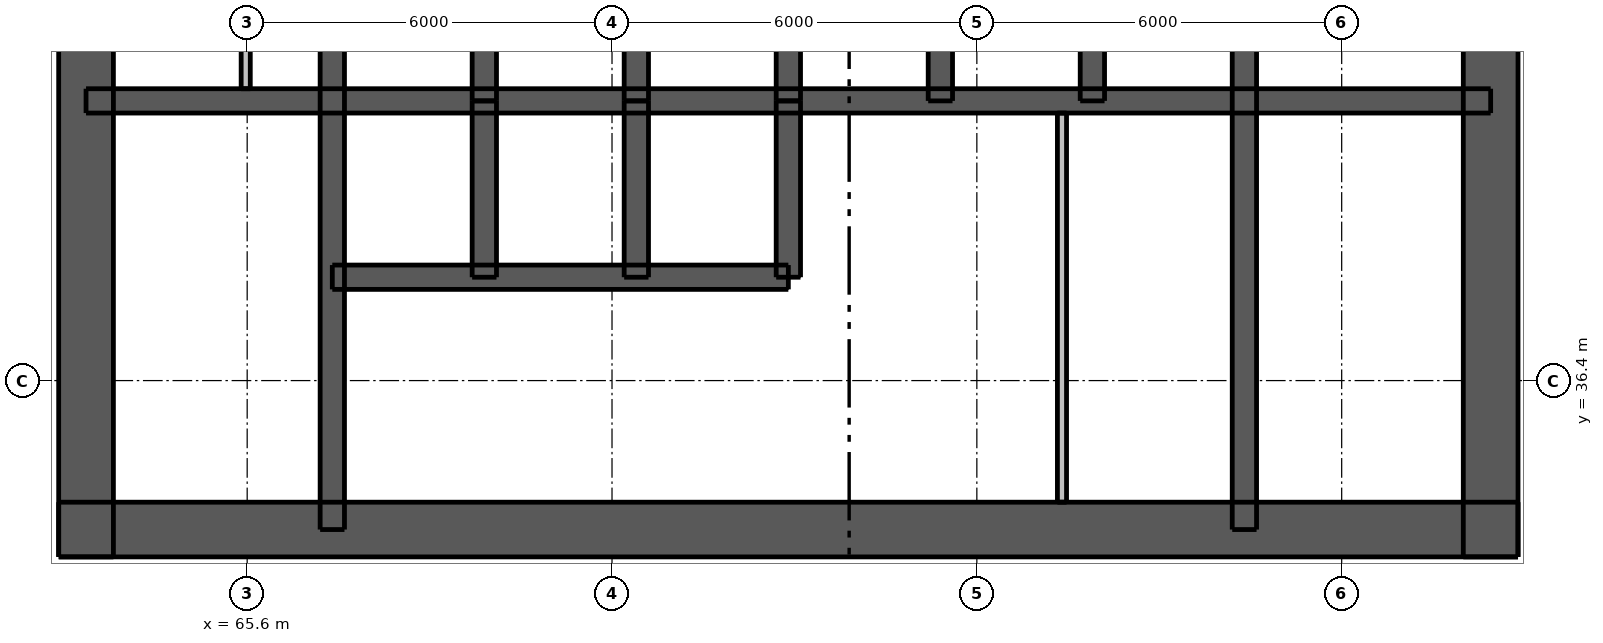
"""IFC4 building model, lengths in metres.
Left out: names, types, materials, properties, quantities, classifications, styles, units other than length and angle.
Written with IfcOpenShell. Run it as: python <this file> out.ifc"""

import sys

from ifc_helpers import new_model, si_unit, direction, frame, frame_2d, origin, place, context, subcontext, project, spatial, rectangle, extrude, element, fill, save


model = new_model("IFC4")
c1 = context("Model", 3, precision=1e-05, world=origin(), true_north=direction((0.0, 1.0)))
c2 = subcontext(c1, "Body", "Model", "MODEL_VIEW")
j1 = project(units=[si_unit("LENGTHUNIT", "METRE"), si_unit("PLANEANGLEUNIT", "RADIAN")], contexts=[c1])
p1 = place(None, origin())
s1 = spatial("IfcSite", under=j1, at=p1, CompositionType="ELEMENT")
p2 = place(p1, origin())
s2 = spatial("IfcBuilding", under=s1, at=p2, CompositionType="ELEMENT")
p3 = place(p2, frame((0.0, 0.0, 49.9)))
s3 = spatial("IfcBuildingStorey", under=s2, at=p3, CompositionType="ELEMENT", Elevation=49.9)
p4 = place(p3, frame((62.5, 33.95, 0.0), z_axis=(0.0, 0.0, 1.0), x_axis=(1.0, 0.0, 0.0)))
e1 = element("IfcWall", 1, at=p4, inside=s3, PredefinedType="SHEAR", context=c2, shape_type="SweptSolid", body=[
    extrude(rectangle(XDim=24.0, YDim=0.9, at=frame_2d((12.0, 0.0))), origin(), (0.0, 0.0, 1.0), 3.05),
])
p5 = place(p4, frame((2.05, 0.0, 0.0)))
e2 = element("IfcOpeningElement", 2, at=p5, cuts=e1, PredefinedType="OPENING", context=c2, shape_type="SweptSolid", body=[
    extrude(rectangle(XDim=1.1, YDim=2.1, at=frame_2d((0.55, 1.05))), frame((0.0, 0.46, 0.0), z_axis=(0.0, -1.0, 0.0), x_axis=(1.0, 0.0, 0.0)), (0.0, 0.0, 1.0), 0.92),
])
p6 = place(p4, frame((20.85, 0.0, 0.0)))
e3 = element("IfcOpeningElement", 3, at=p6, cuts=e1, PredefinedType="OPENING", context=c2, shape_type="SweptSolid", body=[
    extrude(rectangle(XDim=1.1, YDim=2.1, at=frame_2d((0.55, 1.05))), frame((0.0, 0.46, 0.0), z_axis=(0.0, -1.0, 0.0), x_axis=(1.0, 0.0, 0.0)), (0.0, 0.0, 1.0), 0.92),
])
p7 = place(p4, frame((8.0, 0.0, 0.0)))
e4 = element("IfcOpeningElement", 4, at=p7, cuts=e1, PredefinedType="OPENING", context=c2, shape_type="SweptSolid", body=[
    extrude(rectangle(XDim=1.1, YDim=2.1, at=frame_2d((0.55, 1.05))), frame((0.0, 0.46, 0.0), z_axis=(0.0, -1.0, 0.0), x_axis=(1.0, 0.0, 0.0)), (0.0, 0.0, 1.0), 0.92),
])
p8 = place(p4, frame((17.488, 0.0, 0.0)))
e5 = element("IfcOpeningElement", 5, at=p8, cuts=e1, PredefinedType="OPENING", context=c2, shape_type="SweptSolid", body=[
    extrude(rectangle(XDim=0.9, YDim=2.1, at=frame_2d((0.45, 1.05))), frame((0.0, 0.46, 0.0), z_axis=(0.0, -1.0, 0.0), x_axis=(1.0, 0.0, 0.0)), (0.0, 0.0, 1.0), 0.92),
])
p9 = place(p3, frame((62.95, 33.5, 0.0), z_axis=(0.0, 0.0, 1.0), x_axis=(0.0, 1.0, 0.0)))
e6 = element("IfcWall", 6, at=p9, inside=s3, PredefinedType="SHEAR", context=c2, shape_type="SweptSolid", body=[
    extrude(rectangle(XDim=24.0, YDim=0.9, at=frame_2d((12.0, 0.0))), origin(), (0.0, 0.0, 1.0), 3.05),
])
p10 = place(p9, frame((11.2, 0.0, 0.0)))
e7 = element("IfcOpeningElement", 7, at=p10, cuts=e6, PredefinedType="OPENING", context=c2, shape_type="SweptSolid", body=[
    extrude(rectangle(XDim=1.6, YDim=2.1, at=frame_2d((0.8, 1.05))), frame((0.0, 0.46, 0.0), z_axis=(0.0, -1.0, 0.0), x_axis=(1.0, 0.0, 0.0)), (0.0, 0.0, 1.0), 0.92),
])
p11 = place(p3, frame((86.05, 33.5, 0.0), z_axis=(0.0, 0.0, 1.0), x_axis=(0.0, 1.0, 0.0)))
e8 = element("IfcWall", 8, at=p11, inside=s3, PredefinedType="SHEAR", context=c2, shape_type="SweptSolid", body=[
    extrude(rectangle(XDim=24.0, YDim=0.9, at=frame_2d((12.0, 0.0))), origin(), (0.0, 0.0, 1.0), 3.05),
])
p12 = place(p11, frame((11.2, 0.0, 0.0)))
e9 = element("IfcOpeningElement", 9, at=p12, cuts=e8, PredefinedType="OPENING", context=c2, shape_type="SweptSolid", body=[
    extrude(rectangle(XDim=1.6, YDim=2.1, at=frame_2d((0.8, 1.05))), frame((0.0, 0.46, 0.0), z_axis=(0.0, -1.0, 0.0), x_axis=(1.0, 0.0, 0.0)), (0.0, 0.0, 1.0), 0.92),
])
p13 = place(p3, frame((62.95, 41.0, 0.0), z_axis=(0.0, 0.0, 1.0), x_axis=(1.0, 0.0, 0.0)))
e10 = element("IfcWall", 10, at=p13, inside=s3, PredefinedType="SHEAR", context=c2, shape_type="SweptSolid", body=[
    extrude(rectangle(XDim=23.1, YDim=0.4, at=frame_2d((11.55, 0.0))), origin(), (0.0, 0.0, 1.0), 3.05),
])
p14 = place(p3, frame((67.0, 33.95, 0.0), z_axis=(0.0, 0.0, 1.0), x_axis=(0.0, 1.0, 0.0)))
e11 = element("IfcWall", 11, at=p14, inside=s3, PredefinedType="SHEAR", context=c2, shape_type="SweptSolid", body=[
    extrude(rectangle(XDim=9.95, YDim=0.4, at=frame_2d((4.975, 0.0))), origin(), (0.0, 0.0, 1.0), 3.05),
])
p15 = place(p14, frame((0.65, 0.0, 0.0)))
e12 = element("IfcOpeningElement", 12, at=p15, cuts=e11, PredefinedType="OPENING", context=c2, shape_type="SweptSolid", body=[
    extrude(rectangle(XDim=1.1, YDim=2.1, at=frame_2d((0.55, 1.05))), frame((0.0, 0.21, 0.0), z_axis=(0.0, -1.0, 0.0), x_axis=(1.0, 0.0, 0.0)), (0.0, 0.0, 1.0), 0.42),
])
p16 = place(p3, frame((82.0, 33.95, 0.0), z_axis=(0.0, 0.0, 1.0), x_axis=(0.0, 1.0, 0.0)))
e13 = element("IfcWall", 13, at=p16, inside=s3, PredefinedType="SHEAR", context=c2, shape_type="SweptSolid", body=[
    extrude(rectangle(XDim=9.95, YDim=0.4, at=frame_2d((4.975, 0.0))), origin(), (0.0, 0.0, 1.0), 3.05),
])
for number, where, z_axis, x_axis in (
    (14, (69.5, 41.0, 0.0), (0.0, 0.0, 1.0), (0.0, 1.0, 0.0)),
    (15, (72.0, 41.0, 0.0), (0.0, 0.0, 1.0), (0.0, 1.0, 0.0)),
    (16, (74.5, 41.0, 0.0), (0.0, 0.0, 1.0), (0.0, 1.0, 0.0)),
    (17, (77.0, 41.0, 0.0), (0.0, 0.0, 1.0), (0.0, 1.0, 0.0)),
    (18, (79.5, 41.0, 0.0), (0.0, 0.0, 1.0), (0.0, 1.0, 0.0)),
):
    element("IfcWall", number, at=place(p3, frame(where, z_axis=z_axis, x_axis=x_axis)), inside=s3, PredefinedType="SHEAR", context=c2, shape_type="SweptSolid", body=[
        extrude(rectangle(XDim=2.9, YDim=0.4, at=frame_2d((1.45, 0.0))), origin(), (0.0, 0.0, 1.0), 3.05),
    ])
p17 = place(p3, frame((67.0, 38.1, 0.0), z_axis=(0.0, 0.0, 1.0), x_axis=(1.0, 0.0, 0.0)))
e19 = element("IfcWall", 19, at=p17, inside=s3, PredefinedType="SHEAR", context=c2, shape_type="SweptSolid", body=[
    extrude(rectangle(XDim=7.5, YDim=0.4, at=frame_2d((3.75, 0.0))), origin(), (0.0, 0.0, 1.0), 3.05),
])
p18 = place(p17, frame((0.7, 0.0, 0.0)))
e20 = element("IfcOpeningElement", 20, at=p18, cuts=e19, PredefinedType="OPENING", context=c2, shape_type="SweptSolid", body=[
    extrude(rectangle(XDim=1.1, YDim=2.1, at=frame_2d((0.55, 1.05))), frame((0.0, 0.21, 0.0), z_axis=(0.0, -1.0, 0.0), x_axis=(1.0, 0.0, 0.0)), (0.0, 0.0, 1.0), 0.42),
])
p19 = place(p17, frame((3.2, 0.0, 0.0)))
e21 = element("IfcOpeningElement", 21, at=p19, cuts=e19, PredefinedType="OPENING", context=c2, shape_type="SweptSolid", body=[
    extrude(rectangle(XDim=1.1, YDim=2.1, at=frame_2d((0.55, 1.05))), frame((0.0, 0.21, 0.0), z_axis=(0.0, -1.0, 0.0), x_axis=(1.0, 0.0, 0.0)), (0.0, 0.0, 1.0), 0.42),
])
p20 = place(p17, frame((5.65, 0.0, 0.0)))
e22 = element("IfcOpeningElement", 22, at=p20, cuts=e19, PredefinedType="OPENING", context=c2, shape_type="SweptSolid", body=[
    extrude(rectangle(XDim=1.2, YDim=2.1, at=frame_2d((0.6, 1.05))), frame((0.0, 0.21, 0.0), z_axis=(0.0, -1.0, 0.0), x_axis=(1.0, 0.0, 0.0)), (0.0, 0.0, 1.0), 0.42),
])
for number, where, z_axis, x_axis in (
    (23, (69.5, 38.1, 0.0), (0.0, 0.0, 1.0), (0.0, 1.0, 0.0)),
    (24, (72.0, 38.1, 0.0), (0.0, 0.0, 1.0), (0.0, 1.0, 0.0)),
    (25, (74.5, 38.1, 0.0), (0.0, 0.0, 1.0), (0.0, 1.0, 0.0)),
):
    element("IfcWall", number, at=place(p3, frame(where, z_axis=z_axis, x_axis=x_axis)), inside=s3, PredefinedType="SHEAR", context=c2, shape_type="SweptSolid", body=[
        extrude(rectangle(XDim=2.9, YDim=0.4, at=frame_2d((1.45, 0.0))), origin(), (0.0, 0.0, 1.0), 3.05),
    ])
p21 = place(p3, frame((79.0, 34.4, 0.0), z_axis=(0.0, 0.0, 1.0), x_axis=(0.0, 1.0, 0.0)))
e26 = element("IfcWall", 26, at=p21, inside=s3, PredefinedType="PLUMBINGWALL", context=c2, shape_type="SweptSolid", body=[
    extrude(rectangle(XDim=6.4, YDim=0.15, at=frame_2d((3.2, 0.0))), origin(), (0.0, 0.0, 1.0), 3.05),
])
p22 = place(p3, frame((65.576, 41.2, 0.0), z_axis=(0.0, 0.0, 1.0), x_axis=(0.0, 1.0, 0.0)))
e27 = element("IfcWall", 27, at=p22, inside=s3, PredefinedType="PLUMBINGWALL", context=c2, shape_type="SweptSolid", body=[
    extrude(rectangle(XDim=2.5, YDim=0.15, at=frame_2d((1.25, 0.0))), origin(), (0.0, 0.0, 1.0), 3.05),
])
p23 = place(p5, origin())
e28 = element("IfcDoor", 28, at=p23, inside=s3, OperationType="SINGLE_SWING_LEFT", PredefinedType="DOOR", context=c2, shape_type="SweptSolid", body=[
    extrude(rectangle(XDim=1.1, YDim=2.1, at=frame_2d((0.55, 1.05))), frame((0.0, 0.438, 0.0), z_axis=(0.0, -1.0, 0.0), x_axis=(1.0, 0.0, 0.0)), (0.0, 0.0, 1.0), 0.05),
])
fill(e2, e28)
p24 = place(p6, origin())
e29 = element("IfcDoor", 29, at=p24, inside=s3, OperationType="SINGLE_SWING_RIGHT", PredefinedType="DOOR", context=c2, shape_type="SweptSolid", body=[
    extrude(rectangle(XDim=1.1, YDim=2.1, at=frame_2d((0.55, 1.05))), frame((0.0, 0.438, 0.0), z_axis=(0.0, -1.0, 0.0), x_axis=(1.0, 0.0, 0.0)), (0.0, 0.0, 1.0), 0.05),
])
fill(e3, e29)
p25 = place(p7, origin())
e30 = element("IfcDoor", 30, at=p25, inside=s3, OperationType="SINGLE_SWING_LEFT", PredefinedType="DOOR", context=c2, shape_type="SweptSolid", body=[
    extrude(rectangle(XDim=1.1, YDim=2.1, at=frame_2d((0.55, 1.05))), frame((0.0, 0.438, 0.0), z_axis=(0.0, -1.0, 0.0), x_axis=(1.0, 0.0, 0.0)), (0.0, 0.0, 1.0), 0.05),
])
fill(e4, e30)
p26 = place(p15, origin())
e31 = element("IfcDoor", 31, at=p26, inside=s3, OperationType="SINGLE_SWING_RIGHT", PredefinedType="DOOR", context=c2, shape_type="SweptSolid", body=[
    extrude(rectangle(XDim=1.1, YDim=2.1, at=frame_2d((0.55, 1.05))), frame((0.0, -0.138, 0.0), z_axis=(0.0, -1.0, 0.0), x_axis=(1.0, 0.0, 0.0)), (0.0, 0.0, 1.0), 0.05),
])
fill(e12, e31)
p27 = place(p8, origin())
e32 = element("IfcDoor", 32, at=p27, inside=s3, OperationType="SINGLE_SWING_LEFT", PredefinedType="DOOR", context=c2, shape_type="SweptSolid", body=[
    extrude(rectangle(XDim=0.9, YDim=2.1, at=frame_2d((0.45, 1.05))), frame((0.0, 0.438, 0.0), z_axis=(0.0, -1.0, 0.0), x_axis=(1.0, 0.0, 0.0)), (0.0, 0.0, 1.0), 0.05),
])
fill(e5, e32)
p28 = place(p18, origin())
e33 = element("IfcDoor", 33, at=p28, inside=s3, OperationType="DOUBLE_DOOR_SLIDING", PredefinedType="DOOR", context=c2, shape_type="SweptSolid", body=[
    extrude(rectangle(XDim=1.1, YDim=2.1, at=frame_2d((0.55, 1.05))), frame((0.0, 0.025, 0.0), z_axis=(0.0, -1.0, 0.0), x_axis=(1.0, 0.0, 0.0)), (0.0, 0.0, 1.0), 0.05),
])
fill(e20, e33)
p29 = place(p19, origin())
e34 = element("IfcDoor", 34, at=p29, inside=s3, OperationType="DOUBLE_DOOR_SLIDING", PredefinedType="DOOR", context=c2, shape_type="SweptSolid", body=[
    extrude(rectangle(XDim=1.1, YDim=2.1, at=frame_2d((0.55, 1.05))), frame((0.0, 0.025, 0.0), z_axis=(0.0, -1.0, 0.0), x_axis=(1.0, 0.0, 0.0)), (0.0, 0.0, 1.0), 0.05),
])
fill(e21, e34)
p30 = place(p20, origin())
e35 = element("IfcDoor", 35, at=p30, inside=s3, OperationType="DOUBLE_DOOR_SLIDING", PredefinedType="DOOR", context=c2, shape_type="SweptSolid", body=[
    extrude(rectangle(XDim=1.2, YDim=2.1, at=frame_2d((0.6, 1.05))), frame((0.0, 0.025, 0.0), z_axis=(0.0, -1.0, 0.0), x_axis=(1.0, 0.0, 0.0)), (0.0, 0.0, 1.0), 0.05),
])
fill(e22, e35)
save(model, sys.argv[1])
